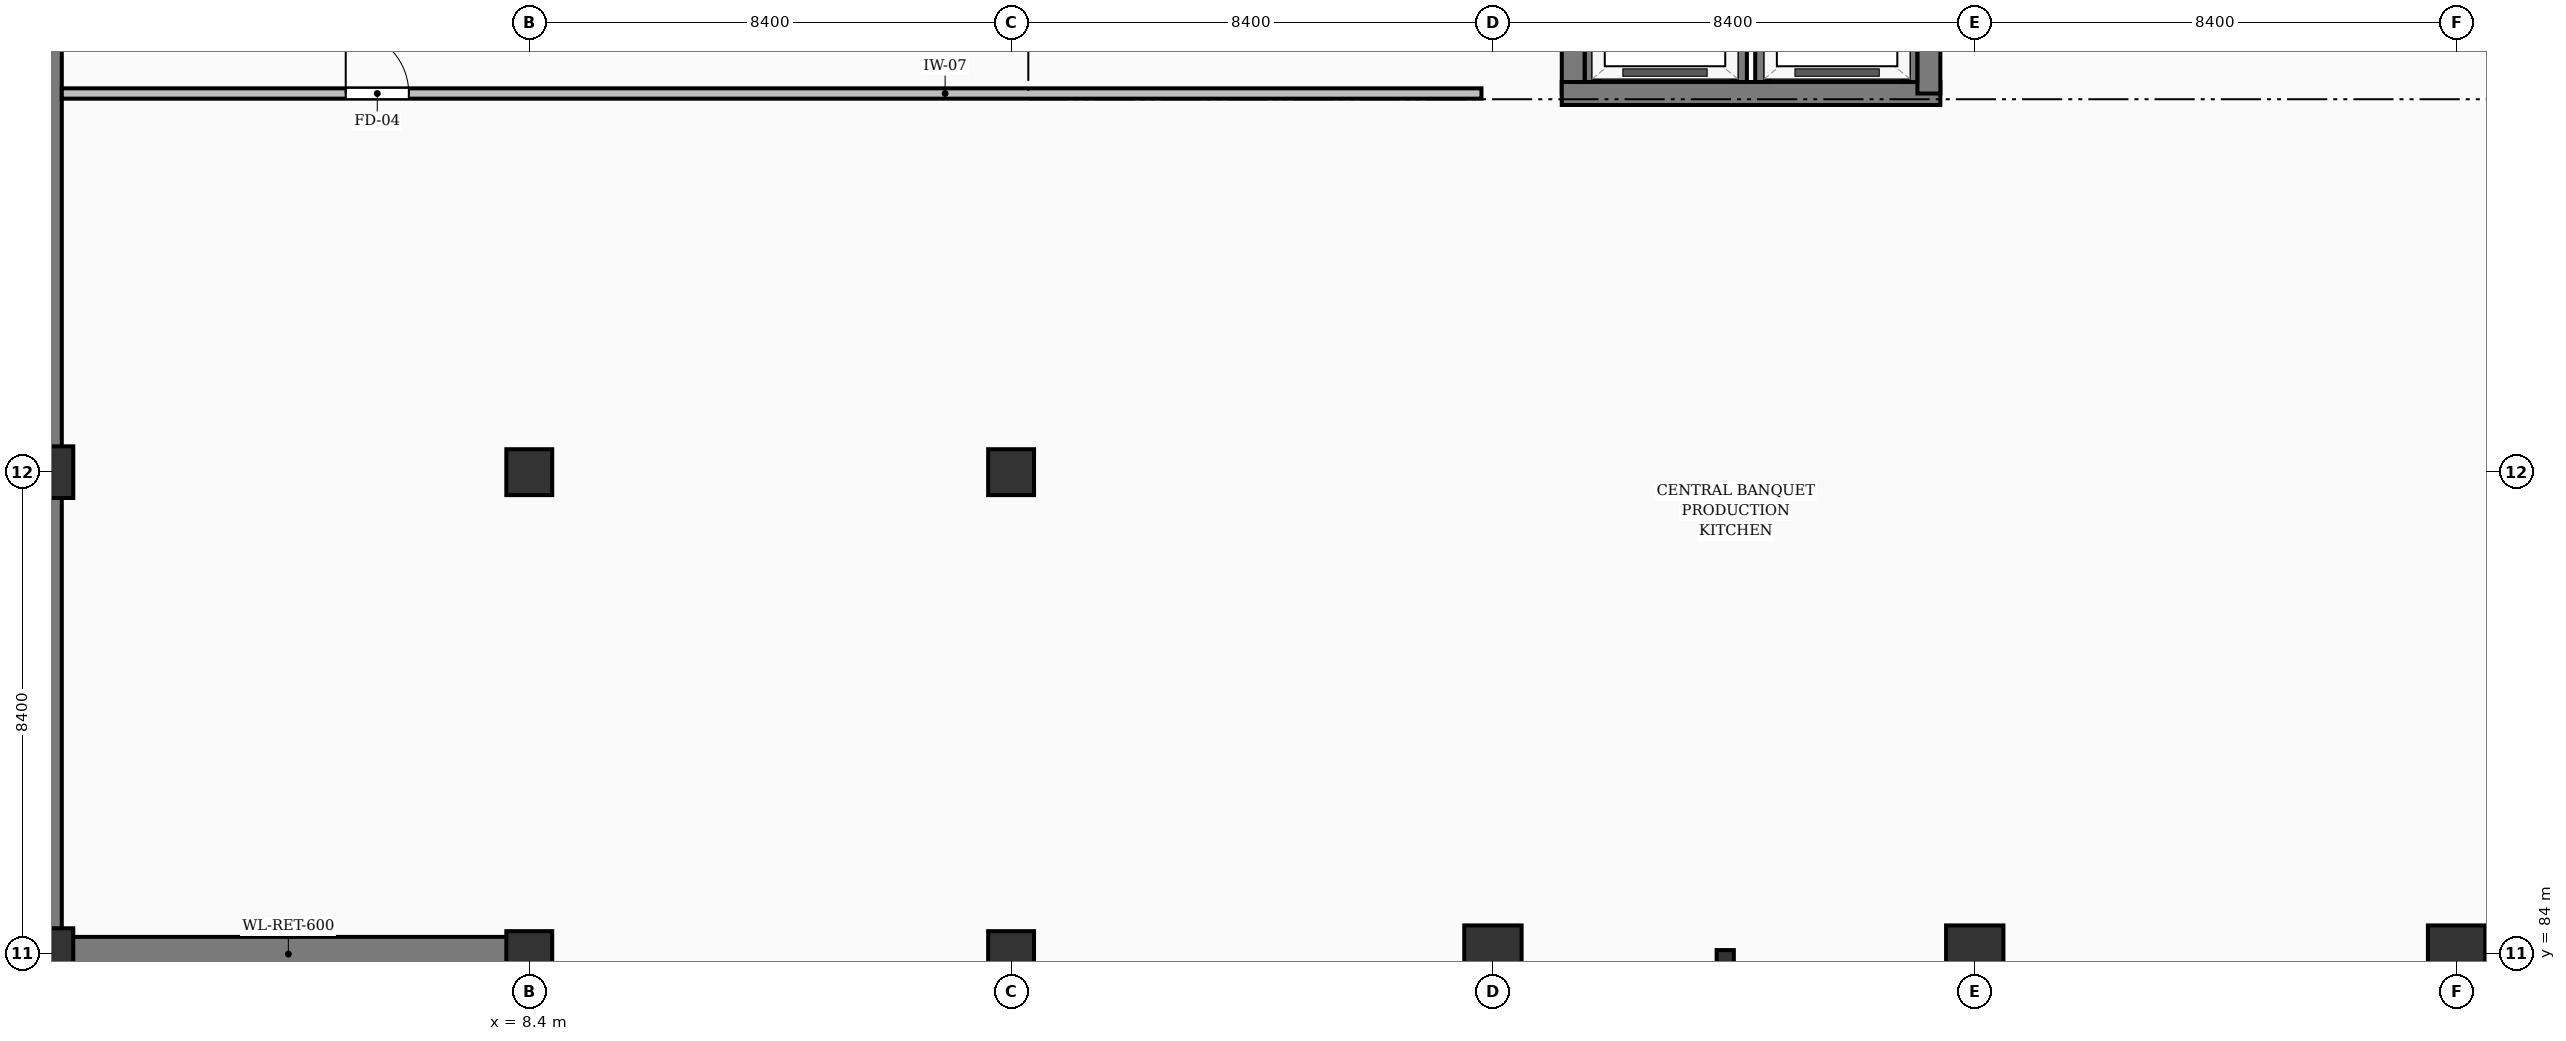
"""IFC4 building model, lengths in metres.
Left out: names, types, materials, properties, quantities, classifications, styles, units other than length and angle.
Written with IfcOpenShell. Run it as: python <this file> out.ifc"""

import sys

from ifc_helpers import new_model, si_unit, direction, frame, frame_2d, origin, origin_2d, place, context, subcontext, project, spatial, rectangle, hollow_rectangle, extrude, element, fill, save


model = new_model("IFC4")
c1 = context("Model", 3, precision=1e-05, world=origin(), true_north=direction((0.0, 1.0)))
c2 = subcontext(c1, "Body", "Model", "MODEL_VIEW")
j1 = project(units=[si_unit("LENGTHUNIT", "METRE"), si_unit("PLANEANGLEUNIT", "RADIAN")], contexts=[c1])
p1 = place(None, origin())
s1 = spatial("IfcSite", under=j1, at=p1, CompositionType="ELEMENT")
p2 = place(p1, origin())
s2 = spatial("IfcBuilding", under=s1, at=p2, CompositionType="ELEMENT")
p3 = place(p2, frame((0.0, 0.0, -4.2)))
s3 = spatial("IfcBuildingStorey", under=s2, at=p3, CompositionType="ELEMENT", Elevation=-4.2)
p4 = place(p3, frame((0.0, 117.6, -0.4), z_axis=(0.0, 0.0, 1.0), x_axis=(0.0, -1.0, 0.0)))
e1 = element("IfcWall", 1, at=p4, inside=s3, PredefinedType="USERDEFINED", context=c2, shape_type="SweptSolid", body=[
    extrude(rectangle(XDim=33.6, YDim=0.5, at=frame_2d((16.8, 0.0))), origin(), (0.0, 0.0, 1.0), 4.25),
])
p5 = place(p3, frame((0.0, 84.0, -0.4), z_axis=(0.0, 0.0, 1.0), x_axis=(1.0, 0.0, 0.0)))
e2 = element("IfcWall", 2, at=p5, inside=s3, PredefinedType="USERDEFINED", context=c2, shape_type="SweptSolid", body=[
    extrude(rectangle(XDim=8.4, YDim=0.6, at=frame_2d((4.2, 0.0))), origin(), (0.0, 0.0, 1.0), 4.25),
])
p6 = place(p3, frame((8.4, 84.0, -0.4), z_axis=(0.0, 0.0, 1.0), x_axis=(0.0, -1.0, 0.0)))
e3 = element("IfcWall", 3, at=p6, inside=s3, PredefinedType="USERDEFINED", context=c2, shape_type="SweptSolid", body=[
    extrude(rectangle(XDim=75.6, YDim=0.5, at=frame_2d((37.8, 0.0))), origin(), (0.0, 0.0, 1.0), 4.25),
])
for number, where, z_axis, x_axis in (
    (4, (0.0, 84.0, 0.0), (0.0, 0.0, 1.0), (1.0, 0.0, 0.0)),
    (5, (0.0, 92.4, 0.0), (0.0, 0.0, 1.0), (1.0, 0.0, 0.0)),
):
    element("IfcColumn", number, at=place(p3, frame(where, z_axis=z_axis, x_axis=x_axis)), inside=s3, PredefinedType="COLUMN", context=c2, shape_type="SweptSolid", body=[
        extrude(rectangle(XDim=0.9, YDim=0.9, at=origin_2d()), origin(), (0.0, 0.0, 1.0), 4.2),
    ])
for number, where, z_axis, x_axis in (
    (6, (8.4, 84.0, 0.0), (0.0, 0.0, 1.0), (1.0, 0.0, 0.0)),
    (7, (8.4, 92.4, 0.0), (0.0, 0.0, 1.0), (1.0, 0.0, 0.0)),
    (8, (16.8, 84.0, 0.0), (0.0, 0.0, 1.0), (1.0, 0.0, 0.0)),
    (9, (16.8, 92.4, 0.0), (0.0, 0.0, 1.0), (1.0, 0.0, 0.0)),
):
    element("IfcColumn", number, at=place(p3, frame(where, z_axis=z_axis, x_axis=x_axis)), inside=s3, PredefinedType="COLUMN", context=c2, shape_type="SweptSolid", body=[
        extrude(rectangle(XDim=0.8, YDim=0.8, at=origin_2d()), origin(), (0.0, 0.0, 1.0), 4.2),
    ])
for number, where, z_axis, x_axis in (
    (10, (25.2, 84.0, 0.0), (0.0, 0.0, 1.0), (1.0, 0.0, 0.0)),
    (11, (33.6, 84.0, 0.0), (0.0, 0.0, 1.0), (1.0, 0.0, 0.0)),
    (12, (42.0, 84.0, 0.0), (0.0, 0.0, 1.0), (1.0, 0.0, 0.0)),
):
    element("IfcColumn", number, at=place(p3, frame(where, z_axis=z_axis, x_axis=x_axis)), inside=s3, PredefinedType="COLUMN", context=c2, shape_type="SweptSolid", body=[
        extrude(rectangle(XDim=1.0, YDim=1.0, at=origin_2d()), origin(), (0.0, 0.0, 1.0), 4.2),
    ])
p7 = place(p3, frame((26.6, 99.0, 0.0), z_axis=(0.0, 0.0, 1.0), x_axis=(0.0, 1.0, 0.0)))
e13 = element("IfcWall", 13, at=p7, inside=s3, PredefinedType="SHEAR", context=c2, shape_type="SweptSolid", body=[
    extrude(rectangle(XDim=6.15, YDim=0.4, at=frame_2d((3.075, 0.0))), origin(), (0.0, 0.0, 1.0), 3.85),
])
p8 = place(p3, frame((26.4, 99.0, 0.0), z_axis=(0.0, 0.0, 1.0), x_axis=(1.0, 0.0, 0.0)))
e14 = element("IfcWall", 14, at=p8, inside=s3, PredefinedType="SHEAR", context=c2, shape_type="SweptSolid", body=[
    extrude(rectangle(XDim=6.6, YDim=0.4, at=frame_2d((3.3, 0.0))), origin(), (0.0, 0.0, 1.0), 3.85),
])
p9 = place(p3, frame((32.8, 99.0, 0.0), z_axis=(0.0, 0.0, 1.0), x_axis=(0.0, 1.0, 0.0)))
e15 = element("IfcWall", 15, at=p9, inside=s3, PredefinedType="SHEAR", context=c2, shape_type="SweptSolid", body=[
    extrude(rectangle(XDim=6.15, YDim=0.4, at=frame_2d((3.075, 0.0))), origin(), (0.0, 0.0, 1.0), 3.85),
])
p10 = place(p3, frame((29.25, 83.92, 0.0), z_axis=(0.0, 0.0, 1.0), x_axis=(1.0, 0.0, 0.0)))
e16 = element("IfcColumn", 16, at=p10, inside=s3, PredefinedType="COLUMN", context=c2, shape_type="SweptSolid", body=[
    extrude(hollow_rectangle(XDim=0.3, YDim=0.3, WallThickness=0.016, at=origin_2d()), origin(), (0.0, 0.0, 1.0), 4.2),
])
for number, where, z_axis, x_axis in (
    (17, (26.93, 99.2, -0.4), (0.0, 0.0, 1.0), (0.0, 1.0, 0.0)),
    (18, (29.5, 99.2, -0.4), (0.0, 0.0, 1.0), (0.0, 1.0, 0.0)),
    (19, (29.9, 99.2, -0.4), (0.0, 0.0, 1.0), (0.0, 1.0, 0.0)),
    (20, (32.47, 99.2, -0.4), (0.0, 0.0, 1.0), (0.0, 1.0, 0.0)),
):
    element("IfcWall", number, at=place(p3, frame(where, z_axis=z_axis, x_axis=x_axis)), inside=s3, PredefinedType="SOLIDWALL", context=c2, shape_type="SweptSolid", body=[
        extrude(rectangle(XDim=2.2, YDim=0.255, at=frame_2d((1.1, 0.0))), origin(), (0.0, 0.0, 1.0), 4.25),
    ])
p11 = place(p3, frame((0.25, 99.0, 0.0), z_axis=(0.0, 0.0, 1.0), x_axis=(1.0, 0.0, 0.0)))
e21 = element("IfcWall", 21, at=p11, inside=s3, PredefinedType="PARTITIONING", context=c2, shape_type="SweptSolid", body=[
    extrude(rectangle(XDim=24.75, YDim=0.18, at=frame_2d((12.375, 0.0))), origin(), (0.0, 0.0, 1.0), 3.85),
])
p12 = place(p11, frame((4.95, 0.0, 0.0)))
e22 = element("IfcOpeningElement", 22, at=p12, cuts=e21, PredefinedType="OPENING", context=c2, shape_type="SweptSolid", body=[
    extrude(rectangle(XDim=1.1, YDim=2.1, at=frame_2d((0.55, 1.05))), frame((0.0, 0.1, 0.0), z_axis=(0.0, -1.0, 0.0), x_axis=(1.0, 0.0, 0.0)), (0.0, 0.0, 1.0), 0.2),
])
p13 = place(p12, origin())
e23 = element("IfcDoor", 23, at=p13, inside=s3, OperationType="SINGLE_SWING_LEFT", PredefinedType="DOOR", context=c2, shape_type="SweptSolid", body=[
    extrude(rectangle(XDim=1.1, YDim=2.1, at=frame_2d((0.55, 1.05))), frame((0.0, 0.025, 0.0), z_axis=(0.0, -1.0, 0.0), x_axis=(1.0, 0.0, 0.0)), (0.0, 0.0, 1.0), 0.05),
])
fill(e22, e23)
save(model, sys.argv[1])
